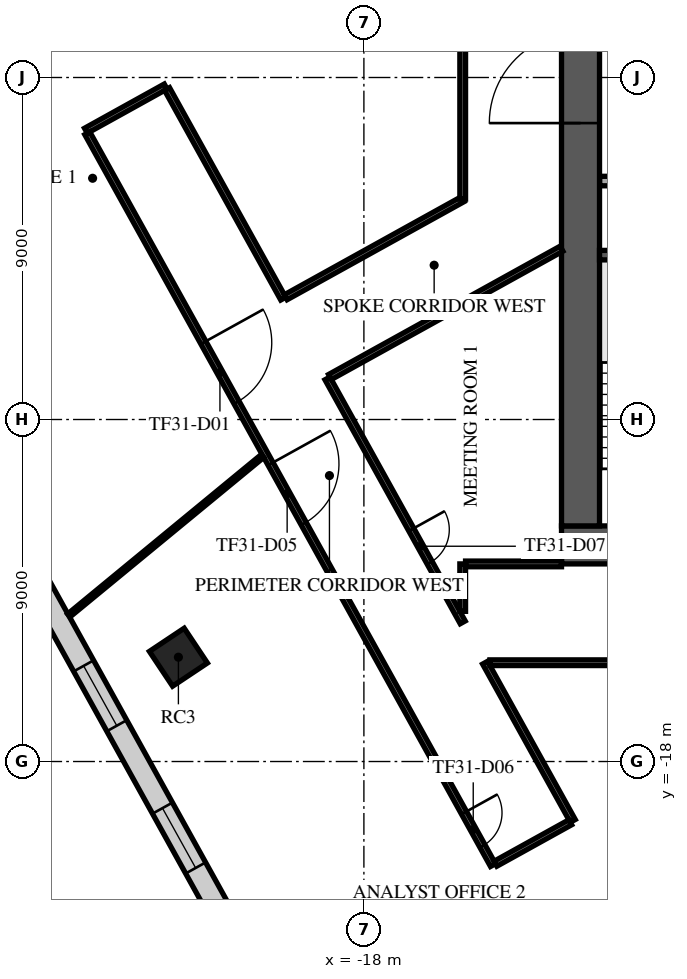
"""IFC4 building model, lengths in metres.
Left out: names, types, materials, properties, quantities, classifications, styles, units other than length and angle.
Written with IfcOpenShell. Run it as: python <this file> out.ifc"""

import sys

from ifc_helpers import new_model, si_unit, direction, frame, frame_2d, origin, origin_2d, place, context, subcontext, project, spatial, rectangle, extrude, element, fill, save


model = new_model("IFC4")
c1 = context("Model", 3, precision=1e-05, world=origin(), true_north=direction((0.0, 1.0)))
c2 = subcontext(c1, "Body", "Model", "MODEL_VIEW")
j1 = project(units=[si_unit("LENGTHUNIT", "METRE"), si_unit("PLANEANGLEUNIT", "RADIAN")], contexts=[c1])
p1 = place(None, origin())
s1 = spatial("IfcSite", under=j1, at=p1, CompositionType="ELEMENT")
p2 = place(p1, origin())
s2 = spatial("IfcBuilding", under=s1, at=p2, CompositionType="ELEMENT")
p3 = place(p2, frame((0.0, 0.0, 139.7)))
s3 = spatial("IfcBuildingStorey", under=s2, at=p3, CompositionType="ELEMENT", Elevation=139.7)
p4 = place(p3, frame((-22.881, -15.255, 0.0), z_axis=(0.0, 0.0, 1.0), x_axis=(0.832028680356, 0.55473261583, 0.0)))
e1 = element("IfcColumn", 1, at=p4, inside=s3, PredefinedType="COLUMN", context=c2, shape_type="SweptSolid", body=[
    extrude(rectangle(XDim=1.1, YDim=1.1, at=origin_2d()), origin(), (0.0, 0.0, 1.0), 4.0),
])
p5 = place(p3, frame((-12.8, -12.3, 0.0), z_axis=(0.0, 0.0, 1.0), x_axis=(1.0, 0.0, 0.0)))
e2 = element("IfcWall", 2, at=p5, inside=s3, PredefinedType="SHEAR", context=c2, shape_type="SweptSolid", body=[
    extrude(rectangle(XDim=25.6, YDim=1.0, at=frame_2d((12.8, 0.0))), origin(), (0.0, 0.0, 1.0), 3.6),
])
p6 = place(p5, frame((7.7, 0.0, 0.0)))
e3 = element("IfcOpeningElement", 3, at=p6, cuts=e2, PredefinedType="OPENING", context=c2, shape_type="SweptSolid", body=[
    extrude(rectangle(XDim=2.0, YDim=2.1, at=frame_2d((1.0, 1.05))), frame((0.0, 0.51, 0.0), z_axis=(0.0, -1.0, 0.0), x_axis=(1.0, 0.0, 0.0)), (0.0, 0.0, 1.0), 1.02),
])
p7 = place(p5, frame((17.825, 0.0, 0.0)))
e4 = element("IfcOpeningElement", 4, at=p7, cuts=e2, PredefinedType="OPENING", context=c2, shape_type="SweptSolid", body=[
    extrude(rectangle(XDim=1.2, YDim=2.1, at=frame_2d((0.6, 1.05))), frame((0.0, 0.51, 0.0), z_axis=(0.0, -1.0, 0.0), x_axis=(1.0, 0.0, 0.0)), (0.0, 0.0, 1.0), 1.02),
])
p8 = place(p5, frame((1.975, 0.0, 0.0)))
e5 = element("IfcOpeningElement", 5, at=p8, cuts=e2, PredefinedType="OPENING", context=c2, shape_type="SweptSolid", body=[
    extrude(rectangle(XDim=1.2, YDim=2.1, at=frame_2d((0.6, 1.05))), frame((0.0, 0.51, 0.0), z_axis=(0.0, -1.0, 0.0), x_axis=(1.0, 0.0, 0.0)), (0.0, 0.0, 1.0), 1.02),
])
p9 = place(p5, frame((22.425, 0.0, 0.0)))
e6 = element("IfcOpeningElement", 6, at=p9, cuts=e2, PredefinedType="OPENING", context=c2, shape_type="SweptSolid", body=[
    extrude(rectangle(XDim=1.2, YDim=2.1, at=frame_2d((0.6, 1.05))), frame((0.0, 0.51, 0.0), z_axis=(0.0, -1.0, 0.0), x_axis=(1.0, 0.0, 0.0)), (0.0, 0.0, 1.0), 1.02),
])
p10 = place(p3, frame((-12.3, -11.8, 0.0), z_axis=(0.0, 0.0, 1.0), x_axis=(0.0, 1.0, 0.0)))
e7 = element("IfcWall", 7, at=p10, inside=s3, PredefinedType="SHEAR", context=c2, shape_type="SweptSolid", body=[
    extrude(rectangle(XDim=23.6, YDim=1.0, at=frame_2d((11.8, 0.0))), origin(), (0.0, 0.0, 1.0), 3.6),
])
p11 = place(p10, frame((10.6, 0.0, 0.0)))
e8 = element("IfcOpeningElement", 8, at=p11, cuts=e7, PredefinedType="OPENING", context=c2, shape_type="SweptSolid", body=[
    extrude(rectangle(XDim=2.4, YDim=2.4, at=frame_2d((1.2, 1.2))), frame((0.0, 0.51, 0.0), z_axis=(0.0, -1.0, 0.0), x_axis=(1.0, 0.0, 0.0)), (0.0, 0.0, 1.0), 1.02),
])
p12 = place(p3, frame((-8.65, -4.675, 0.0), z_axis=(0.0, 0.0, 1.0), x_axis=(-1.0, 0.0, 0.0)))
e9 = element("IfcWall", 9, at=p12, inside=s3, PredefinedType="SOLIDWALL", context=c2, shape_type="SweptSolid", body=[
    extrude(rectangle(XDim=3.15, YDim=0.25, at=frame_2d((1.575, 0.0))), origin(), (0.0, 0.0, 1.0), 3.6),
])
p13 = place(p3, frame((-11.795, -2.725, 0.0), z_axis=(0.0, 0.0, 1.0), x_axis=(1.0, 0.0, 0.0)))
e10 = element("IfcWall", 10, at=p13, inside=s3, PredefinedType="PARTITIONING", context=c2, shape_type="SweptSolid", body=[
    extrude(rectangle(XDim=8.915, YDim=0.25, at=frame_2d((4.458, 0.0))), origin(), (0.0, 0.0, 1.0), 3.6),
])
p14 = place(p13, frame((1.295, 0.0, 0.0)))
e11 = element("IfcOpeningElement", 11, at=p14, cuts=e10, PredefinedType="OPENING", context=c2, shape_type="SweptSolid", body=[
    extrude(rectangle(XDim=1.0, YDim=2.1, at=frame_2d((0.5, 1.05))), frame((0.0, 0.135, 0.0), z_axis=(0.0, -1.0, 0.0), x_axis=(1.0, 0.0, 0.0)), (0.0, 0.0, 1.0), 0.27),
])
p15 = place(p13, frame((4.42, 0.0, 0.0)))
e12 = element("IfcOpeningElement", 12, at=p15, cuts=e10, PredefinedType="OPENING", context=c2, shape_type="SweptSolid", body=[
    extrude(rectangle(XDim=1.0, YDim=2.1, at=frame_2d((0.5, 1.05))), frame((0.0, 0.135, 0.0), z_axis=(0.0, -1.0, 0.0), x_axis=(1.0, 0.0, 0.0)), (0.0, 0.0, 1.0), 0.27),
])
p16 = place(p3, frame((-36.291, 4.209, 0.0), z_axis=(0.0, 0.0, 1.0), x_axis=(0.484810659622, -0.874619131003, 0.0)))
e13 = element("IfcWall", 13, at=p16, inside=s3, PredefinedType="STANDARD", context=c2, shape_type="SweptSolid", body=[
    extrude(rectangle(XDim=42.552, YDim=0.6, at=frame_2d((21.276, 0.0))), origin(), (0.0, 0.0, 1.0), 3.6),
])
p17 = place(p16, frame((1.178, 0.0, 0.9)))
e14 = element("IfcOpeningElement", 14, at=p17, cuts=e13, PredefinedType="OPENING", context=c2, shape_type="SweptSolid", body=[
    extrude(rectangle(XDim=1.8, YDim=2.1, at=frame_2d((0.9, 1.05))), frame((0.0, 0.31, 0.0), z_axis=(0.0, -1.0, 0.0), x_axis=(1.0, 0.0, 0.0)), (0.0, 0.0, 1.0), 0.62),
])
p18 = place(p16, frame((5.396, 0.0, 0.9)))
e15 = element("IfcOpeningElement", 15, at=p18, cuts=e13, PredefinedType="OPENING", context=c2, shape_type="SweptSolid", body=[
    extrude(rectangle(XDim=1.8, YDim=2.1, at=frame_2d((0.9, 1.05))), frame((0.0, 0.31, 0.0), z_axis=(0.0, -1.0, 0.0), x_axis=(1.0, 0.0, 0.0)), (0.0, 0.0, 1.0), 0.62),
])
p19 = place(p16, frame((13.956, 0.0, 0.9)))
e16 = element("IfcOpeningElement", 16, at=p19, cuts=e13, PredefinedType="OPENING", context=c2, shape_type="SweptSolid", body=[
    extrude(rectangle(XDim=1.8, YDim=2.1, at=frame_2d((0.9, 1.05))), frame((0.0, 0.31, 0.0), z_axis=(0.0, -1.0, 0.0), x_axis=(1.0, 0.0, 0.0)), (0.0, 0.0, 1.0), 0.62),
])
p20 = place(p16, frame((18.236, 0.0, 0.9)))
e17 = element("IfcOpeningElement", 17, at=p20, cuts=e13, PredefinedType="OPENING", context=c2, shape_type="SweptSolid", body=[
    extrude(rectangle(XDim=1.8, YDim=2.1, at=frame_2d((0.9, 1.05))), frame((0.0, 0.31, 0.0), z_axis=(0.0, -1.0, 0.0), x_axis=(1.0, 0.0, 0.0)), (0.0, 0.0, 1.0), 0.62),
])
p21 = place(p16, frame((22.516, 0.0, 0.9)))
e18 = element("IfcOpeningElement", 18, at=p21, cuts=e13, PredefinedType="OPENING", context=c2, shape_type="SweptSolid", body=[
    extrude(rectangle(XDim=1.8, YDim=2.1, at=frame_2d((0.9, 1.05))), frame((0.0, 0.31, 0.0), z_axis=(0.0, -1.0, 0.0), x_axis=(1.0, 0.0, 0.0)), (0.0, 0.0, 1.0), 0.62),
])
p22 = place(p16, frame((26.796, 0.0, 0.9)))
e19 = element("IfcOpeningElement", 19, at=p22, cuts=e13, PredefinedType="OPENING", context=c2, shape_type="SweptSolid", body=[
    extrude(rectangle(XDim=1.8, YDim=2.1, at=frame_2d((0.9, 1.05))), frame((0.0, 0.31, 0.0), z_axis=(0.0, -1.0, 0.0), x_axis=(1.0, 0.0, 0.0)), (0.0, 0.0, 1.0), 0.62),
])
p23 = place(p16, frame((31.076, 0.0, 0.9)))
e20 = element("IfcOpeningElement", 20, at=p23, cuts=e13, PredefinedType="OPENING", context=c2, shape_type="SweptSolid", body=[
    extrude(rectangle(XDim=1.8, YDim=2.1, at=frame_2d((0.9, 1.05))), frame((0.0, 0.31, 0.0), z_axis=(0.0, -1.0, 0.0), x_axis=(1.0, 0.0, 0.0)), (0.0, 0.0, 1.0), 0.62),
])
p24 = place(p16, frame((35.356, 0.0, 0.9)))
e21 = element("IfcOpeningElement", 21, at=p24, cuts=e13, PredefinedType="OPENING", context=c2, shape_type="SweptSolid", body=[
    extrude(rectangle(XDim=1.8, YDim=2.1, at=frame_2d((0.9, 1.05))), frame((0.0, 0.31, 0.0), z_axis=(0.0, -1.0, 0.0), x_axis=(1.0, 0.0, 0.0)), (0.0, 0.0, 1.0), 0.62),
])
p25 = place(p16, frame((39.573, 0.0, 0.9)))
e22 = element("IfcOpeningElement", 22, at=p25, cuts=e13, PredefinedType="OPENING", context=c2, shape_type="SweptSolid", body=[
    extrude(rectangle(XDim=1.8, YDim=2.1, at=frame_2d((0.9, 1.05))), frame((0.0, 0.31, 0.0), z_axis=(0.0, -1.0, 0.0), x_axis=(1.0, 0.0, 0.0)), (0.0, 0.0, 1.0), 0.62),
])
p26 = place(p3, frame((-25.315, -1.401, 0.0), z_axis=(0.0, 0.0, 1.0), x_axis=(0.874550463112, 0.484934518745, 0.0)))
e23 = element("IfcWall", 23, at=p26, inside=s3, PredefinedType="PARTITIONING", context=c2, shape_type="SweptSolid", body=[
    extrude(rectangle(XDim=2.4, YDim=0.15, at=frame_2d((1.2, 0.0))), origin(), (0.0, 0.0, 1.0), 3.15),
])
p27 = place(p3, frame((-25.279, -1.467, 0.0), z_axis=(0.0, 0.0, 1.0), x_axis=(0.484803020703, -0.874623365294, 0.0)))
e24 = element("IfcWall", 24, at=p27, inside=s3, PredefinedType="PARTITIONING", context=c2, shape_type="SweptSolid", body=[
    extrude(rectangle(XDim=22.02, YDim=0.15, at=frame_2d((11.01, 0.0))), origin(), (0.0, 0.0, 1.0), 3.15),
])
p28 = place(p27, frame((6.3, 0.0, 0.0)))
e25 = element("IfcOpeningElement", 25, at=p28, cuts=e24, PredefinedType="OPENING", context=c2, shape_type="SweptSolid", body=[
    extrude(rectangle(XDim=1.8, YDim=2.1, at=frame_2d((0.9, 1.05))), frame((0.0, 0.085, 0.0), z_axis=(0.0, -1.0, 0.0), x_axis=(1.0, 0.0, 0.0)), (0.0, 0.0, 1.0), 0.17),
])
p29 = place(p27, frame((9.948, 0.0, 0.0)))
e26 = element("IfcOpeningElement", 26, at=p29, cuts=e24, PredefinedType="OPENING", context=c2, shape_type="SweptSolid", body=[
    extrude(rectangle(XDim=1.8, YDim=2.1, at=frame_2d((0.9, 1.05))), frame((0.0, 0.085, 0.0), z_axis=(0.0, -1.0, 0.0), x_axis=(1.0, 0.0, 0.0)), (0.0, 0.0, 1.0), 0.17),
])
p30 = place(p27, frame((20.448, 0.0, 0.0)))
e27 = element("IfcOpeningElement", 27, at=p30, cuts=e24, PredefinedType="OPENING", context=c2, shape_type="SweptSolid", body=[
    extrude(rectangle(XDim=1.0, YDim=2.1, at=frame_2d((0.5, 1.05))), frame((0.0, 0.085, 0.0), z_axis=(0.0, -1.0, 0.0), x_axis=(1.0, 0.0, 0.0)), (0.0, 0.0, 1.0), 0.17),
])
p31 = place(p3, frame((-23.18, -0.302, 0.0), z_axis=(0.0, 0.0, 1.0), x_axis=(0.48477505554, -0.874638865776, 0.0)))
e28 = element("IfcWall", 28, at=p31, inside=s3, PredefinedType="PARTITIONING", context=c2, shape_type="SweptSolid", body=[
    extrude(rectangle(XDim=6.307, YDim=0.15, at=frame_2d((3.154, 0.0))), origin(), (0.0, 0.0, 1.0), 3.15),
])
p32 = place(p3, frame((-20.056, -5.783, 0.0), z_axis=(0.0, 0.0, 1.0), x_axis=(0.874645694613, 0.484762734638, 0.0)))
e29 = element("IfcWall", 29, at=p32, inside=s3, PredefinedType="PARTITIONING", context=c2, shape_type="SweptSolid", body=[
    extrude(rectangle(XDim=5.324, YDim=0.15, at=frame_2d((2.662, 0.0))), origin(), (0.0, 0.0, 1.0), 3.15),
])
p33 = place(p3, frame((-18.959, -7.918, 0.0), z_axis=(0.0, 0.0, 1.0), x_axis=(0.484857684507, -0.874593062958, 0.0)))
e30 = element("IfcWall", 30, at=p33, inside=s3, PredefinedType="PARTITIONING", context=c2, shape_type="SweptSolid", body=[
    extrude(rectangle(XDim=7.341, YDim=0.15, at=frame_2d((3.67, 0.0))), origin(), (0.0, 0.0, 1.0), 3.15),
])
p34 = place(p33, frame((4.55, 0.0, 0.0)))
e31 = element("IfcOpeningElement", 31, at=p34, cuts=e30, PredefinedType="OPENING", context=c2, shape_type="SweptSolid", body=[
    extrude(rectangle(XDim=1.0, YDim=2.1, at=frame_2d((0.5, 1.05))), frame((0.0, 0.085, 0.0), z_axis=(0.0, -1.0, 0.0), x_axis=(1.0, 0.0, 0.0)), (0.0, 0.0, 1.0), 0.17),
])
p35 = place(p3, frame((-18.893, -7.882, 0.0), z_axis=(0.0, 0.0, 1.0), x_axis=(0.874670900287, 0.484717253861, 0.0)))
e32 = element("IfcWall", 32, at=p35, inside=s3, PredefinedType="PARTITIONING", context=c2, shape_type="SweptSolid", body=[
    extrude(rectangle(XDim=6.966, YDim=0.15, at=frame_2d((3.483, 0.0))), origin(), (0.0, 0.0, 1.0), 3.15),
])
p36 = place(p3, frame((-15.4, -14.048, 0.0), z_axis=(0.0, 0.0, 1.0), x_axis=(0.0, 1.0, 0.0)))
e33 = element("IfcWall", 33, at=p36, inside=s3, PredefinedType="PARTITIONING", context=c2, shape_type="SweptSolid", body=[
    extrude(rectangle(XDim=1.248, YDim=0.15, at=frame_2d((0.624, 0.0))), origin(), (0.0, 0.0, 1.0), 3.15),
])
p37 = place(p3, frame((-15.4, -3.201, 0.0), z_axis=(0.0, 0.0, 1.0), x_axis=(0.0, 1.0, 0.0)))
e34 = element("IfcWall", 34, at=p37, inside=s3, PredefinedType="PARTITIONING", context=c2, shape_type="SweptSolid", body=[
    extrude(rectangle(XDim=13.896, YDim=0.15, at=frame_2d((6.948, 0.0))), origin(), (0.0, 0.0, 1.0), 3.15),
])
p38 = place(p37, frame((4.05, 0.0, 0.0)))
e35 = element("IfcOpeningElement", 35, at=p38, cuts=e34, PredefinedType="OPENING", context=c2, shape_type="SweptSolid", body=[
    extrude(rectangle(XDim=1.0, YDim=2.1, at=frame_2d((0.5, 1.05))), frame((0.0, 0.085, 0.0), z_axis=(0.0, -1.0, 0.0), x_axis=(1.0, 0.0, 0.0)), (0.0, 0.0, 1.0), 0.17),
])
p39 = place(p37, frame((7.546, 0.0, 0.0)))
e36 = element("IfcOpeningElement", 36, at=p39, cuts=e34, PredefinedType="OPENING", context=c2, shape_type="SweptSolid", body=[
    extrude(rectangle(XDim=1.0, YDim=2.1, at=frame_2d((0.5, 1.05))), frame((0.0, 0.085, 0.0), z_axis=(0.0, -1.0, 0.0), x_axis=(1.0, 0.0, 0.0)), (0.0, 0.0, 1.0), 0.17),
])
p40 = place(p3, frame((-15.325, -12.8, 0.0), z_axis=(0.0, 0.0, 1.0), x_axis=(1.0, 0.0, 0.0)))
e37 = element("IfcWall", 37, at=p40, inside=s3, PredefinedType="PARTITIONING", context=c2, shape_type="SweptSolid", body=[
    extrude(rectangle(XDim=2.525, YDim=0.15, at=frame_2d((1.262, 0.0))), origin(), (0.0, 0.0, 1.0), 3.03),
])
p41 = place(p3, frame((-14.811, -15.4, 0.0), z_axis=(0.0, 0.0, 1.0), x_axis=(0.484728084089, -0.874664898401, 0.0)))
e38 = element("IfcWall", 38, at=p41, inside=s3, PredefinedType="PARTITIONING", context=c2, shape_type="SweptSolid", body=[
    extrude(rectangle(XDim=4.76, YDim=0.15, at=frame_2d((2.38, 0.0))), origin(), (0.0, 0.0, 1.0), 3.15),
])
p42 = place(p3, frame((-14.684, -15.4, 0.0), z_axis=(0.0, 0.0, 1.0), x_axis=(1.0, 0.0, 0.0)))
e39 = element("IfcWall", 39, at=p42, inside=s3, PredefinedType="PARTITIONING", context=c2, shape_type="SweptSolid", body=[
    extrude(rectangle(XDim=21.596, YDim=0.15, at=frame_2d((10.798, 0.0))), origin(), (0.0, 0.0, 1.0), 3.15),
])
p43 = place(p42, frame((7.322, 0.0, 0.0)))
e40 = element("IfcOpeningElement", 40, at=p43, cuts=e39, PredefinedType="OPENING", context=c2, shape_type="SweptSolid", body=[
    extrude(rectangle(XDim=1.8, YDim=2.1, at=frame_2d((0.9, 1.05))), frame((0.0, 0.085, 0.0), z_axis=(0.0, -1.0, 0.0), x_axis=(1.0, 0.0, 0.0)), (0.0, 0.0, 1.0), 0.17),
])
p44 = place(p42, frame((15.487, 0.0, 0.0)))
e41 = element("IfcOpeningElement", 41, at=p44, cuts=e39, PredefinedType="OPENING", context=c2, shape_type="SweptSolid", body=[
    extrude(rectangle(XDim=1.0, YDim=2.1, at=frame_2d((0.5, 1.05))), frame((0.0, 0.085, 0.0), z_axis=(0.0, -1.0, 0.0), x_axis=(1.0, 0.0, 0.0)), (0.0, 0.0, 1.0), 0.17),
])
p45 = place(p3, frame((-14.537, -20.69, 0.0), z_axis=(0.0, 0.0, 1.0), x_axis=(0.874699347934, 0.48466591661, 0.0)))
e42 = element("IfcWall", 42, at=p45, inside=s3, PredefinedType="PARTITIONING", context=c2, shape_type="SweptSolid", body=[
    extrude(rectangle(XDim=2.25, YDim=0.15, at=frame_2d((1.125, 0.0))), origin(), (0.0, 0.0, 1.0), 3.15),
])
p46 = place(p3, frame((-25.765, -14.157, 0.0), z_axis=(0.0, 0.0, 1.0), x_axis=(0.772001730939, 0.635620427164, 0.0)))
e43 = element("IfcWall", 43, at=p46, inside=s3, PredefinedType="PARTITIONING", context=c2, shape_type="SweptSolid", body=[
    extrude(rectangle(XDim=6.604, YDim=0.1, at=frame_2d((3.302, 0.0))), origin(), (0.0, 0.0, 1.0), 3.15),
])
p47 = place(p11, origin())
e44 = element("IfcDoor", 44, at=p47, inside=s3, OperationType="SINGLE_SWING_LEFT", PredefinedType="DOOR", context=c2, shape_type="SweptSolid", body=[
    extrude(rectangle(XDim=2.4, YDim=2.4, at=frame_2d((1.2, 1.2))), frame((0.0, 0.025, 0.0), z_axis=(0.0, -1.0, 0.0), x_axis=(1.0, 0.0, 0.0)), (0.0, 0.0, 1.0), 0.05),
])
fill(e8, e44)
p48 = place(p21, origin())
e45 = element("IfcWindow", 45, at=p48, inside=s3, PartitioningType="SINGLE_PANEL", PredefinedType="WINDOW", context=c2, shape_type="SweptSolid", body=[
    extrude(rectangle(XDim=1.8, YDim=2.1, at=frame_2d((0.9, 1.05))), frame((0.0, 0.03, 0.0), z_axis=(0.0, -1.0, 0.0), x_axis=(1.0, 0.0, 0.0)), (0.0, 0.0, 1.0), 0.06),
])
fill(e18, e45)
p49 = place(p22, origin())
e46 = element("IfcWindow", 46, at=p49, inside=s3, PartitioningType="SINGLE_PANEL", PredefinedType="WINDOW", context=c2, shape_type="SweptSolid", body=[
    extrude(rectangle(XDim=1.8, YDim=2.1, at=frame_2d((0.9, 1.05))), frame((0.0, 0.03, 0.0), z_axis=(0.0, -1.0, 0.0), x_axis=(1.0, 0.0, 0.0)), (0.0, 0.0, 1.0), 0.06),
])
fill(e19, e46)
p50 = place(p28, frame((1.8, 0.0, 0.0), z_axis=(0.0, 0.0, 1.0), x_axis=(-1.0, 0.0, 0.0)))
e47 = element("IfcDoor", 47, at=p50, inside=s3, OperationType="DOUBLE_DOOR_SINGLE_SWING", PredefinedType="DOOR", context=c2, shape_type="SweptSolid", body=[
    extrude(rectangle(XDim=1.8, YDim=2.1, at=frame_2d((0.9, 1.05))), frame((0.0, 0.025, 0.0), z_axis=(0.0, -1.0, 0.0), x_axis=(1.0, 0.0, 0.0)), (0.0, 0.0, 1.0), 0.05),
])
fill(e25, e47)
p51 = place(p29, frame((1.8, 0.0, 0.0), z_axis=(0.0, 0.0, 1.0), x_axis=(-1.0, 0.0, 0.0)))
e48 = element("IfcDoor", 48, at=p51, inside=s3, OperationType="DOUBLE_DOOR_SINGLE_SWING", PredefinedType="DOOR", context=c2, shape_type="SweptSolid", body=[
    extrude(rectangle(XDim=1.8, YDim=2.1, at=frame_2d((0.9, 1.05))), frame((0.0, 0.025, 0.0), z_axis=(0.0, -1.0, 0.0), x_axis=(1.0, 0.0, 0.0)), (0.0, 0.0, 1.0), 0.05),
])
fill(e26, e48)
p52 = place(p30, frame((1.0, 0.0, 0.0), z_axis=(0.0, 0.0, 1.0), x_axis=(-1.0, 0.0, 0.0)))
e49 = element("IfcDoor", 49, at=p52, inside=s3, OperationType="SINGLE_SWING_LEFT", PredefinedType="DOOR", context=c2, shape_type="SweptSolid", body=[
    extrude(rectangle(XDim=1.0, YDim=2.1, at=frame_2d((0.5, 1.05))), frame((0.0, 0.025, 0.0), z_axis=(0.0, -1.0, 0.0), x_axis=(1.0, 0.0, 0.0)), (0.0, 0.0, 1.0), 0.05),
])
fill(e27, e49)
p53 = place(p34, origin())
e50 = element("IfcDoor", 50, at=p53, inside=s3, OperationType="SINGLE_SWING_LEFT", PredefinedType="DOOR", context=c2, shape_type="SweptSolid", body=[
    extrude(rectangle(XDim=1.0, YDim=2.1, at=frame_2d((0.5, 1.05))), frame((0.0, 0.025, 0.0), z_axis=(0.0, -1.0, 0.0), x_axis=(1.0, 0.0, 0.0)), (0.0, 0.0, 1.0), 0.05),
])
fill(e31, e50)
save(model, sys.argv[1])
